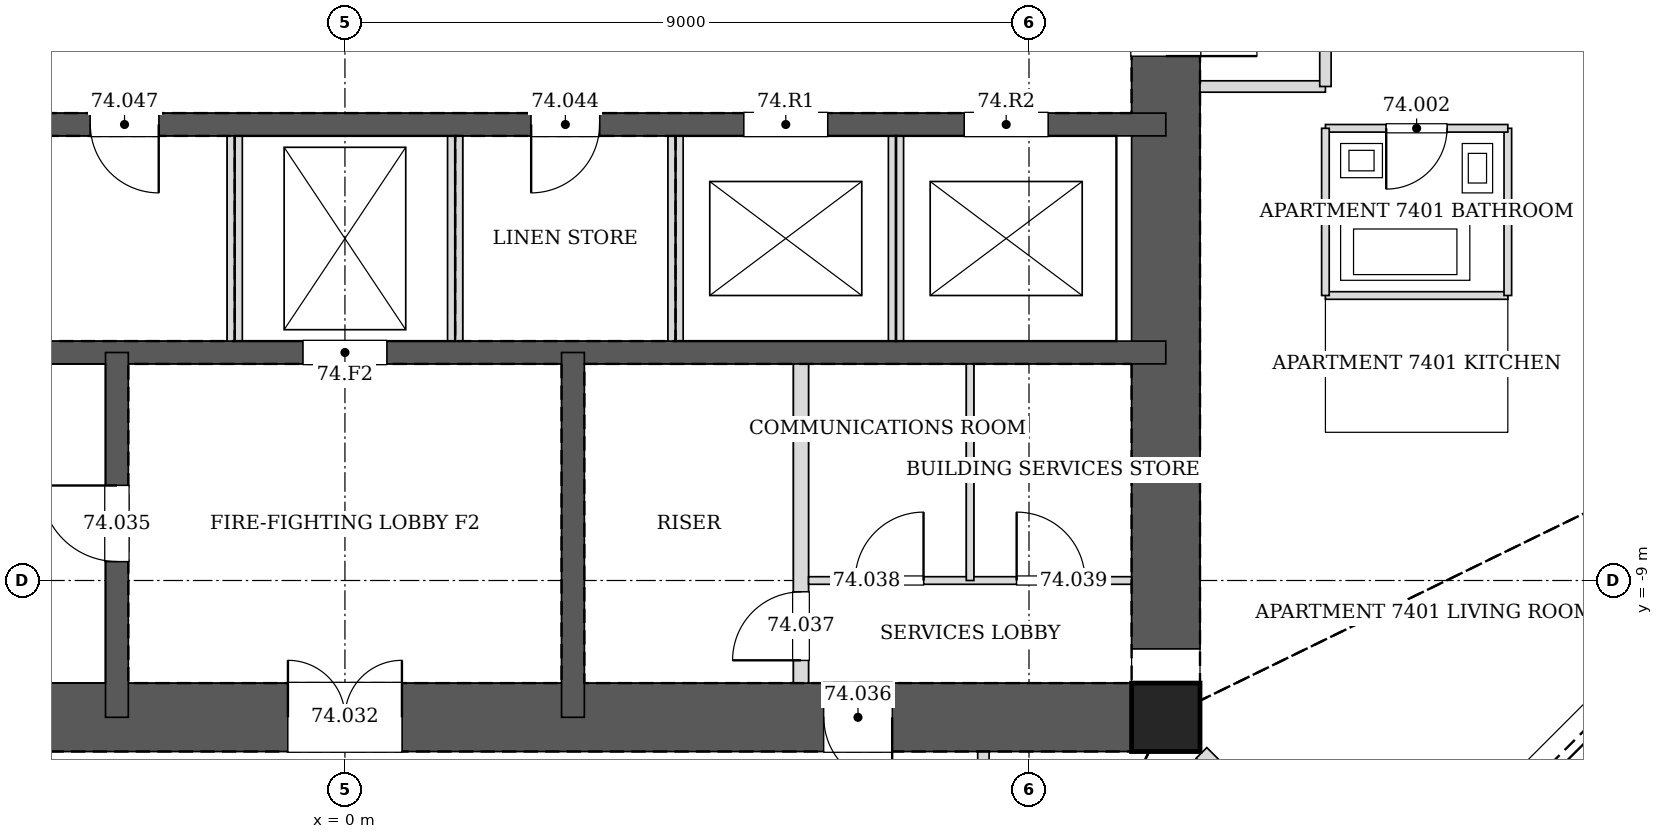
"""IFC4 building model, lengths in metres.
Left out: names, types, materials, properties, quantities, classifications, styles, units other than length and angle.
Written with IfcOpenShell. Run it as: python <this file> out.ifc"""

import sys

from ifc_helpers import new_model, si_unit, direction, frame, frame_2d, origin, origin_2d, place, context, subcontext, project, spatial, rectangle, hollow_rectangle, extrude, element, fill, save


model = new_model("IFC4")
c1 = context("Model", 3, precision=1e-05, world=origin(), true_north=direction((0.0, 1.0)))
c2 = subcontext(c1, "Body", "Model", "MODEL_VIEW")
j1 = project(units=[si_unit("LENGTHUNIT", "METRE"), si_unit("PLANEANGLEUNIT", "RADIAN")], contexts=[c1])
p1 = place(None, origin())
s1 = spatial("IfcSite", under=j1, at=p1, CompositionType="ELEMENT")
p2 = place(p1, origin())
s2 = spatial("IfcBuilding", under=s1, at=p2, CompositionType="ELEMENT")
p3 = place(p2, frame((0.0, 0.0, 301.4)))
s3 = spatial("IfcBuildingStorey", under=s2, at=p3, CompositionType="ELEMENT", Elevation=301.4)
p4 = place(p3, frame((10.8, -10.8, 0.0), z_axis=(0.0, 0.0, 1.0), x_axis=(1.0, 0.0, 0.0)))
e1 = element("IfcColumn", 1, at=p4, inside=s3, PredefinedType="COLUMN", context=c2, shape_type="SweptSolid", body=[
    extrude(hollow_rectangle(XDim=0.9, YDim=0.9, WallThickness=0.04, at=origin_2d()), origin(), (0.0, 0.0, 1.0), 3.4),
])
p5 = place(p3, frame((-10.8, -10.8, 0.0), z_axis=(0.0, 0.0, 1.0), x_axis=(1.0, 0.0, 0.0)))
e2 = element("IfcWall", 2, at=p5, inside=s3, PredefinedType="SOLIDWALL", context=c2, shape_type="SweptSolid", body=[
    extrude(rectangle(XDim=21.6, YDim=0.9, at=frame_2d((10.8, 0.0))), origin(), (0.0, 0.0, 1.0), 3.4),
])
p6 = place(p5, frame((10.05, 0.0, 0.0)))
e3 = element("IfcOpeningElement", 3, at=p6, cuts=e2, PredefinedType="OPENING", context=c2, shape_type="SweptSolid", body=[
    extrude(rectangle(XDim=1.5, YDim=2.1, at=frame_2d((0.75, 1.05))), frame((0.0, 0.46, 0.0), z_axis=(0.0, -1.0, 0.0), x_axis=(1.0, 0.0, 0.0)), (0.0, 0.0, 1.0), 0.92),
])
p7 = place(p5, frame((17.1, 0.0, 0.0)))
e4 = element("IfcOpeningElement", 4, at=p7, cuts=e2, PredefinedType="OPENING", context=c2, shape_type="SweptSolid", body=[
    extrude(rectangle(XDim=0.9, YDim=2.1, at=frame_2d((0.45, 1.05))), frame((0.0, 0.46, 0.0), z_axis=(0.0, -1.0, 0.0), x_axis=(1.0, 0.0, 0.0)), (0.0, 0.0, 1.0), 0.92),
])
p8 = place(p3, frame((10.8, -10.8, 0.0), z_axis=(0.0, 0.0, 1.0), x_axis=(0.0, 1.0, 0.0)))
e5 = element("IfcWall", 5, at=p8, inside=s3, PredefinedType="SOLIDWALL", context=c2, shape_type="SweptSolid", body=[
    extrude(rectangle(XDim=21.6, YDim=0.9, at=frame_2d((10.8, 0.0))), origin(), (0.0, 0.0, 1.0), 3.4),
])
p9 = place(p8, frame((11.7, 0.0, 0.0)))
e6 = element("IfcOpeningElement", 6, at=p9, cuts=e5, PredefinedType="OPENING", context=c2, shape_type="SweptSolid", body=[
    extrude(rectangle(XDim=1.2, YDim=2.1, at=frame_2d((0.6, 1.05))), frame((0.0, 0.46, 0.0), z_axis=(0.0, -1.0, 0.0), x_axis=(1.0, 0.0, 0.0)), (0.0, 0.0, 1.0), 0.92),
])
p10 = place(p8, frame((8.7, 0.0, 0.0)))
e7 = element("IfcOpeningElement", 7, at=p10, cuts=e5, PredefinedType="OPENING", context=c2, shape_type="SweptSolid", body=[
    extrude(rectangle(XDim=1.2, YDim=2.1, at=frame_2d((0.6, 1.05))), frame((0.0, 0.46, 0.0), z_axis=(0.0, -1.0, 0.0), x_axis=(1.0, 0.0, 0.0)), (0.0, 0.0, 1.0), 0.92),
])
p11 = place(p3, frame((-10.8, -3.0, 0.0), z_axis=(0.0, 0.0, 1.0), x_axis=(1.0, 0.0, 0.0)))
e8 = element("IfcWall", 8, at=p11, inside=s3, PredefinedType="SOLIDWALL", context=c2, shape_type="SweptSolid", body=[
    extrude(rectangle(XDim=21.6, YDim=0.3, at=frame_2d((10.8, 0.0))), origin(), (0.0, 0.0, 1.0), 3.4),
])
p12 = place(p11, frame((13.25, 0.0, 0.0)))
e9 = element("IfcOpeningElement", 9, at=p12, cuts=e8, PredefinedType="OPENING", context=c2, shape_type="SweptSolid", body=[
    extrude(rectangle(XDim=0.9, YDim=2.1, at=frame_2d((0.45, 1.05))), frame((0.0, 0.16, 0.0), z_axis=(0.0, -1.0, 0.0), x_axis=(1.0, 0.0, 0.0)), (0.0, 0.0, 1.0), 0.32),
])
p13 = place(p11, frame((1.65, 0.0, 0.0)))
e10 = element("IfcOpeningElement", 10, at=p13, cuts=e8, PredefinedType="OPENING", context=c2, shape_type="SweptSolid", body=[
    extrude(rectangle(XDim=0.9, YDim=2.1, at=frame_2d((0.45, 1.05))), frame((0.0, 0.16, 0.0), z_axis=(0.0, -1.0, 0.0), x_axis=(1.0, 0.0, 0.0)), (0.0, 0.0, 1.0), 0.32),
])
p14 = place(p11, frame((4.55, 0.0, 0.0)))
e11 = element("IfcOpeningElement", 11, at=p14, cuts=e8, PredefinedType="OPENING", context=c2, shape_type="SweptSolid", body=[
    extrude(rectangle(XDim=0.9, YDim=2.1, at=frame_2d((0.45, 1.05))), frame((0.0, 0.16, 0.0), z_axis=(0.0, -1.0, 0.0), x_axis=(1.0, 0.0, 0.0)), (0.0, 0.0, 1.0), 0.32),
])
p15 = place(p11, frame((7.45, 0.0, 0.0)))
e12 = element("IfcOpeningElement", 12, at=p15, cuts=e8, PredefinedType="OPENING", context=c2, shape_type="SweptSolid", body=[
    extrude(rectangle(XDim=0.9, YDim=2.1, at=frame_2d((0.45, 1.05))), frame((0.0, 0.16, 0.0), z_axis=(0.0, -1.0, 0.0), x_axis=(1.0, 0.0, 0.0)), (0.0, 0.0, 1.0), 0.32),
])
p16 = place(p11, frame((16.05, 0.0, 0.0)))
e13 = element("IfcOpeningElement", 13, at=p16, cuts=e8, PredefinedType="OPENING", context=c2, shape_type="SweptSolid", body=[
    extrude(rectangle(XDim=1.1, YDim=2.1, at=frame_2d((0.55, 1.05))), frame((0.0, 0.16, 0.0), z_axis=(0.0, -1.0, 0.0), x_axis=(1.0, 0.0, 0.0)), (0.0, 0.0, 1.0), 0.32),
])
p17 = place(p11, frame((18.95, 0.0, 0.0)))
e14 = element("IfcOpeningElement", 14, at=p17, cuts=e8, PredefinedType="OPENING", context=c2, shape_type="SweptSolid", body=[
    extrude(rectangle(XDim=1.1, YDim=2.1, at=frame_2d((0.55, 1.05))), frame((0.0, 0.16, 0.0), z_axis=(0.0, -1.0, 0.0), x_axis=(1.0, 0.0, 0.0)), (0.0, 0.0, 1.0), 0.32),
])
p18 = place(p3, frame((-10.8, -6.0, 0.0), z_axis=(0.0, 0.0, 1.0), x_axis=(1.0, 0.0, 0.0)))
e15 = element("IfcWall", 15, at=p18, inside=s3, PredefinedType="SOLIDWALL", context=c2, shape_type="SweptSolid", body=[
    extrude(rectangle(XDim=21.6, YDim=0.3, at=frame_2d((10.8, 0.0))), origin(), (0.0, 0.0, 1.0), 3.4),
])
p19 = place(p18, frame((10.25, 0.0, 0.0)))
e16 = element("IfcOpeningElement", 16, at=p19, cuts=e15, PredefinedType="OPENING", context=c2, shape_type="SweptSolid", body=[
    extrude(rectangle(XDim=1.1, YDim=2.1, at=frame_2d((0.55, 1.05))), frame((0.0, 0.16, 0.0), z_axis=(0.0, -1.0, 0.0), x_axis=(1.0, 0.0, 0.0)), (0.0, 0.0, 1.0), 0.32),
])
p20 = place(p3, frame((-3.0, -6.0, 0.0), z_axis=(0.0, 0.0, 1.0), x_axis=(0.0, -1.0, 0.0)))
e17 = element("IfcWall", 17, at=p20, inside=s3, PredefinedType="SOLIDWALL", context=c2, shape_type="SweptSolid", body=[
    extrude(rectangle(XDim=4.8, YDim=0.3, at=frame_2d((2.4, 0.0))), origin(), (0.0, 0.0, 1.0), 3.4),
])
p21 = place(p20, frame((1.75, 0.0, 0.0)))
e18 = element("IfcOpeningElement", 18, at=p21, cuts=e17, PredefinedType="OPENING", context=c2, shape_type="SweptSolid", body=[
    extrude(rectangle(XDim=1.0, YDim=2.1, at=frame_2d((0.5, 1.05))), frame((0.0, 0.16, 0.0), z_axis=(0.0, -1.0, 0.0), x_axis=(1.0, 0.0, 0.0)), (0.0, 0.0, 1.0), 0.32),
])
p22 = place(p3, frame((3.0, -6.0, 0.0), z_axis=(0.0, 0.0, 1.0), x_axis=(0.0, -1.0, 0.0)))
e19 = element("IfcWall", 19, at=p22, inside=s3, PredefinedType="SOLIDWALL", context=c2, shape_type="SweptSolid", body=[
    extrude(rectangle(XDim=4.8, YDim=0.3, at=frame_2d((2.4, 0.0))), origin(), (0.0, 0.0, 1.0), 3.4),
])
p23 = place(p3, frame((11.25, -2.5, 0.0), z_axis=(0.0, 0.0, 1.0), x_axis=(1.0, 0.0, 0.0)))
e20 = element("IfcWall", 20, at=p23, inside=s3, PredefinedType="PARTITIONING", context=c2, shape_type="SweptSolid", body=[
    extrude(rectangle(XDim=1.65, YDim=0.15, at=frame_2d((0.825, 0.0))), origin(), (0.0, 0.0, 1.0), 3.2),
])
p24 = place(p3, frame((12.9, -2.5, 0.0), z_axis=(0.0, 0.0, 1.0), x_axis=(0.0, 1.0, 0.0)))
e21 = element("IfcWall", 21, at=p24, inside=s3, PredefinedType="PARTITIONING", context=c2, shape_type="SweptSolid", body=[
    extrude(rectangle(XDim=8.651, YDim=0.15, at=frame_2d((4.325, 0.0))), origin(), (0.0, 0.0, 1.0), 2.349),
])
p25 = place(p24, frame((3.851, 0.0, 0.0)))
e22 = element("IfcOpeningElement", 22, at=p25, cuts=e21, PredefinedType="OPENING", context=c2, shape_type="SweptSolid", body=[
    extrude(rectangle(XDim=0.95, YDim=2.1, at=frame_2d((0.475, 1.05))), frame((0.0, 0.085, 0.0), z_axis=(0.0, -1.0, 0.0), x_axis=(1.0, 0.0, 0.0)), (0.0, 0.0, 1.0), 0.17),
])
p26 = place(p3, frame((8.4, -12.9, 0.0), z_axis=(0.0, 0.0, 1.0), x_axis=(0.0, 1.0, 0.0)))
e23 = element("IfcWall", 23, at=p26, inside=s3, PredefinedType="PARTITIONING", context=c2, shape_type="SweptSolid", body=[
    extrude(rectangle(XDim=1.65, YDim=0.15, at=frame_2d((0.825, 0.0))), origin(), (0.0, 0.0, 1.0), 3.2),
])
p27 = place(p3, frame((15.3, -5.25, 0.0), z_axis=(0.0, 0.0, 1.0), x_axis=(-1.0, 0.0, 0.0)))
e24 = element("IfcWall", 24, at=p27, inside=s3, PredefinedType="PARTITIONING", context=c2, shape_type="SweptSolid", body=[
    extrude(rectangle(XDim=2.4, YDim=0.1, at=frame_2d((1.2, 0.0))), origin(), (0.0, 0.0, 1.0), 2.662),
])
p28 = place(p3, frame((15.3, -5.25, 0.0), z_axis=(0.0, 0.0, 1.0), x_axis=(0.0, 1.0, 0.0)))
e25 = element("IfcWall", 25, at=p28, inside=s3, PredefinedType="PARTITIONING", context=c2, shape_type="SweptSolid", body=[
    extrude(rectangle(XDim=2.2, YDim=0.1, at=frame_2d((1.1, 0.0))), origin(), (0.0, 0.0, 1.0), 3.2),
])
p29 = place(p3, frame((15.3, -3.05, 0.0), z_axis=(0.0, 0.0, 1.0), x_axis=(-1.0, 0.0, 0.0)))
e26 = element("IfcWall", 26, at=p29, inside=s3, PredefinedType="PARTITIONING", context=c2, shape_type="SweptSolid", body=[
    extrude(rectangle(XDim=2.4, YDim=0.1, at=frame_2d((1.2, 0.0))), origin(), (0.0, 0.0, 1.0), 2.662),
])
p30 = place(p29, frame((0.8, 0.0, 0.0)))
e27 = element("IfcOpeningElement", 27, at=p30, cuts=e26, PredefinedType="OPENING", context=c2, shape_type="SweptSolid", body=[
    extrude(rectangle(XDim=0.8, YDim=2.1, at=frame_2d((0.4, 1.05))), frame((0.0, 0.06, 0.0), z_axis=(0.0, -1.0, 0.0), x_axis=(1.0, 0.0, 0.0)), (0.0, 0.0, 1.0), 0.12),
])
p31 = place(p3, frame((12.9, -3.05, 0.0), z_axis=(0.0, 0.0, 1.0), x_axis=(0.0, -1.0, 0.0)))
e28 = element("IfcWall", 28, at=p31, inside=s3, PredefinedType="PARTITIONING", context=c2, shape_type="SweptSolid", body=[
    extrude(rectangle(XDim=2.2, YDim=0.1, at=frame_2d((1.1, 0.0))), origin(), (0.0, 0.0, 1.0), 3.2),
])
p32 = place(p3, frame((11.269, -11.269, 0.0), z_axis=(0.0, 0.0, 1.0), x_axis=(0.707106781187, -0.707106781187, 0.0)))
e29 = element("IfcWall", 29, at=p32, inside=s3, PredefinedType="PARTITIONING", context=c2, shape_type="SweptSolid", body=[
    extrude(rectangle(XDim=2.411, YDim=0.2, at=frame_2d((1.206, 0.0))), origin(), (0.0, 0.0, 1.0), 2.591),
])
for number, where, z_axis, x_axis in (
    (30, (-1.45, -5.85, 0.0), (0.0, 0.0, 1.0), (0.0, 1.0, 0.0)),
    (31, (1.45, -5.85, 0.0), (0.0, 0.0, 1.0), (0.0, 1.0, 0.0)),
    (32, (4.35, -5.85, 0.0), (0.0, 0.0, 1.0), (0.0, 1.0, 0.0)),
):
    element("IfcWall", number, at=place(p3, frame(where, z_axis=z_axis, x_axis=x_axis)), inside=s3, PredefinedType="PARTITIONING", context=c2, shape_type="SweptSolid", body=[
        extrude(rectangle(XDim=2.7, YDim=0.2, at=frame_2d((1.35, 0.0))), origin(), (0.0, 0.0, 1.0), 3.2),
    ])
p33 = place(p3, frame((7.25, -5.85, 0.0), z_axis=(0.0, 0.0, 1.0), x_axis=(0.0, 1.0, 0.0)))
e33 = element("IfcWall", 33, at=p33, inside=s3, PredefinedType="PARTITIONING", context=c2, shape_type="SweptSolid", body=[
    extrude(rectangle(XDim=2.7, YDim=0.2, at=frame_2d((1.35, 0.0))), origin(), (0.0, 0.0, 1.0), 3.4),
])
p34 = place(p3, frame((6.0, -10.35, 0.0), z_axis=(0.0, 0.0, 1.0), x_axis=(0.0, 1.0, 0.0)))
e34 = element("IfcWall", 34, at=p34, inside=s3, PredefinedType="PARTITIONING", context=c2, shape_type="SweptSolid", body=[
    extrude(rectangle(XDim=4.2, YDim=0.2, at=frame_2d((2.1, 0.0))), origin(), (0.0, 0.0, 1.0), 3.2),
])
p35 = place(p34, frame((0.3, 0.0, 0.0)))
e35 = element("IfcOpeningElement", 35, at=p35, cuts=e34, PredefinedType="OPENING", context=c2, shape_type="SweptSolid", body=[
    extrude(rectangle(XDim=0.9, YDim=2.1, at=frame_2d((0.45, 1.05))), frame((0.0, 0.11, 0.0), z_axis=(0.0, -1.0, 0.0), x_axis=(1.0, 0.0, 0.0)), (0.0, 0.0, 1.0), 0.22),
])
p36 = place(p3, frame((6.1, -9.0, 0.0), z_axis=(0.0, 0.0, 1.0), x_axis=(1.0, 0.0, 0.0)))
e36 = element("IfcWall", 36, at=p36, inside=s3, PredefinedType="PARTITIONING", context=c2, shape_type="SweptSolid", body=[
    extrude(rectangle(XDim=4.25, YDim=0.1, at=frame_2d((2.125, 0.0))), origin(), (0.0, 0.0, 1.0), 3.2),
])
p37 = place(p36, frame((0.613, 0.0, 0.0)))
e37 = element("IfcOpeningElement", 37, at=p37, cuts=e36, PredefinedType="OPENING", context=c2, shape_type="SweptSolid", body=[
    extrude(rectangle(XDim=0.9, YDim=2.1, at=frame_2d((0.45, 1.05))), frame((0.0, 0.06, 0.0), z_axis=(0.0, -1.0, 0.0), x_axis=(1.0, 0.0, 0.0)), (0.0, 0.0, 1.0), 0.12),
])
p38 = place(p36, frame((2.738, 0.0, 0.0)))
e38 = element("IfcOpeningElement", 38, at=p38, cuts=e36, PredefinedType="OPENING", context=c2, shape_type="SweptSolid", body=[
    extrude(rectangle(XDim=0.9, YDim=2.1, at=frame_2d((0.45, 1.05))), frame((0.0, 0.06, 0.0), z_axis=(0.0, -1.0, 0.0), x_axis=(1.0, 0.0, 0.0)), (0.0, 0.0, 1.0), 0.12),
])
p39 = place(p3, frame((8.225, -9.0, 0.0), z_axis=(0.0, 0.0, 1.0), x_axis=(0.0, 1.0, 0.0)))
e39 = element("IfcWall", 39, at=p39, inside=s3, PredefinedType="PARTITIONING", context=c2, shape_type="SweptSolid", body=[
    extrude(rectangle(XDim=2.85, YDim=0.1, at=frame_2d((1.425, 0.0))), origin(), (0.0, 0.0, 1.0), 3.2),
])
p40 = place(p30, origin())
e40 = element("IfcDoor", 40, at=p40, inside=s3, OperationType="SINGLE_SWING_RIGHT", PredefinedType="DOOR", context=c2, shape_type="SweptSolid", body=[
    extrude(rectangle(XDim=0.8, YDim=2.1, at=frame_2d((0.4, 1.05))), frame((0.0, 0.025, 0.0), z_axis=(0.0, -1.0, 0.0), x_axis=(1.0, 0.0, 0.0)), (0.0, 0.0, 1.0), 0.05),
])
fill(e27, e40)
p41 = place(p10, frame((1.2, 0.0, 0.0), z_axis=(0.0, 0.0, 1.0), x_axis=(-1.0, 0.0, 0.0)))
e41 = element("IfcDoor", 41, at=p41, inside=s3, OperationType="SINGLE_SWING_RIGHT", PredefinedType="DOOR", context=c2, shape_type="SweptSolid", body=[
    extrude(rectangle(XDim=1.2, YDim=2.1, at=frame_2d((0.6, 1.05))), frame((0.0, 0.025, 0.0), z_axis=(0.0, -1.0, 0.0), x_axis=(1.0, 0.0, 0.0)), (0.0, 0.0, 1.0), 0.05),
])
fill(e7, e41)
p42 = place(p6, origin())
e42 = element("IfcDoor", 42, at=p42, inside=s3, OperationType="DOUBLE_DOOR_SINGLE_SWING", PredefinedType="DOOR", context=c2, shape_type="SweptSolid", body=[
    extrude(rectangle(XDim=1.5, YDim=2.1, at=frame_2d((0.75, 1.05))), frame((0.0, 0.025, 0.0), z_axis=(0.0, -1.0, 0.0), x_axis=(1.0, 0.0, 0.0)), (0.0, 0.0, 1.0), 0.05),
])
fill(e3, e42)
p43 = place(p21, frame((1.0, 0.0, 0.0), z_axis=(0.0, 0.0, 1.0), x_axis=(-1.0, 0.0, 0.0)))
e43 = element("IfcDoor", 43, at=p43, inside=s3, OperationType="SINGLE_SWING_RIGHT", PredefinedType="DOOR", context=c2, shape_type="SweptSolid", body=[
    extrude(rectangle(XDim=1.0, YDim=2.1, at=frame_2d((0.5, 1.05))), frame((0.0, 0.025, 0.0), z_axis=(0.0, -1.0, 0.0), x_axis=(1.0, 0.0, 0.0)), (0.0, 0.0, 1.0), 0.05),
])
fill(e18, e43)
p44 = place(p7, frame((0.9, 0.0, 0.0), z_axis=(0.0, 0.0, 1.0), x_axis=(-1.0, 0.0, 0.0)))
e44 = element("IfcDoor", 44, at=p44, inside=s3, OperationType="SINGLE_SWING_LEFT", PredefinedType="DOOR", context=c2, shape_type="SweptSolid", body=[
    extrude(rectangle(XDim=0.9, YDim=2.1, at=frame_2d((0.45, 1.05))), frame((0.0, 0.025, 0.0), z_axis=(0.0, -1.0, 0.0), x_axis=(1.0, 0.0, 0.0)), (0.0, 0.0, 1.0), 0.05),
])
fill(e4, e44)
p45 = place(p35, origin())
e45 = element("IfcDoor", 45, at=p45, inside=s3, OperationType="SINGLE_SWING_LEFT", PredefinedType="DOOR", context=c2, shape_type="SweptSolid", body=[
    extrude(rectangle(XDim=0.9, YDim=2.1, at=frame_2d((0.45, 1.05))), frame((0.0, 0.025, 0.0), z_axis=(0.0, -1.0, 0.0), x_axis=(1.0, 0.0, 0.0)), (0.0, 0.0, 1.0), 0.05),
])
fill(e35, e45)
p46 = place(p37, origin())
e46 = element("IfcDoor", 46, at=p46, inside=s3, OperationType="SINGLE_SWING_RIGHT", PredefinedType="DOOR", context=c2, shape_type="SweptSolid", body=[
    extrude(rectangle(XDim=0.9, YDim=2.1, at=frame_2d((0.45, 1.05))), frame((0.0, 0.025, 0.0), z_axis=(0.0, -1.0, 0.0), x_axis=(1.0, 0.0, 0.0)), (0.0, 0.0, 1.0), 0.05),
])
fill(e37, e46)
p47 = place(p38, origin())
e47 = element("IfcDoor", 47, at=p47, inside=s3, OperationType="SINGLE_SWING_LEFT", PredefinedType="DOOR", context=c2, shape_type="SweptSolid", body=[
    extrude(rectangle(XDim=0.9, YDim=2.1, at=frame_2d((0.45, 1.05))), frame((0.0, 0.025, 0.0), z_axis=(0.0, -1.0, 0.0), x_axis=(1.0, 0.0, 0.0)), (0.0, 0.0, 1.0), 0.05),
])
fill(e38, e47)
p48 = place(p12, frame((0.9, 0.0, 0.0), z_axis=(0.0, 0.0, 1.0), x_axis=(-1.0, 0.0, 0.0)))
e48 = element("IfcDoor", 48, at=p48, inside=s3, OperationType="SINGLE_SWING_RIGHT", PredefinedType="DOOR", context=c2, shape_type="SweptSolid", body=[
    extrude(rectangle(XDim=0.9, YDim=2.1, at=frame_2d((0.45, 1.05))), frame((0.0, 0.025, 0.0), z_axis=(0.0, -1.0, 0.0), x_axis=(1.0, 0.0, 0.0)), (0.0, 0.0, 1.0), 0.05),
])
fill(e9, e48)
p49 = place(p15, frame((0.9, 0.0, 0.0), z_axis=(0.0, 0.0, 1.0), x_axis=(-1.0, 0.0, 0.0)))
e49 = element("IfcDoor", 49, at=p49, inside=s3, OperationType="SINGLE_SWING_LEFT", PredefinedType="DOOR", context=c2, shape_type="SweptSolid", body=[
    extrude(rectangle(XDim=0.9, YDim=2.1, at=frame_2d((0.45, 1.05))), frame((0.0, 0.025, 0.0), z_axis=(0.0, -1.0, 0.0), x_axis=(1.0, 0.0, 0.0)), (0.0, 0.0, 1.0), 0.05),
])
fill(e12, e49)
p50 = place(p19, origin())
e50 = element("IfcDoor", 50, at=p50, inside=s3, OperationType="DOUBLE_DOOR_SLIDING", PredefinedType="DOOR", context=c2, shape_type="SweptSolid", body=[
    extrude(rectangle(XDim=1.1, YDim=2.1, at=frame_2d((0.55, 1.05))), frame((0.0, 0.025, 0.0), z_axis=(0.0, -1.0, 0.0), x_axis=(1.0, 0.0, 0.0)), (0.0, 0.0, 1.0), 0.05),
])
fill(e16, e50)
p51 = place(p16, origin())
e51 = element("IfcDoor", 51, at=p51, inside=s3, OperationType="DOUBLE_DOOR_SLIDING", PredefinedType="DOOR", context=c2, shape_type="SweptSolid", body=[
    extrude(rectangle(XDim=1.1, YDim=2.1, at=frame_2d((0.55, 1.05))), frame((0.0, 0.025, 0.0), z_axis=(0.0, -1.0, 0.0), x_axis=(1.0, 0.0, 0.0)), (0.0, 0.0, 1.0), 0.05),
])
fill(e13, e51)
p52 = place(p17, origin())
e52 = element("IfcDoor", 52, at=p52, inside=s3, OperationType="DOUBLE_DOOR_SLIDING", PredefinedType="DOOR", context=c2, shape_type="SweptSolid", body=[
    extrude(rectangle(XDim=1.1, YDim=2.1, at=frame_2d((0.55, 1.05))), frame((0.0, 0.025, 0.0), z_axis=(0.0, -1.0, 0.0), x_axis=(1.0, 0.0, 0.0)), (0.0, 0.0, 1.0), 0.05),
])
fill(e14, e52)
save(model, sys.argv[1])
